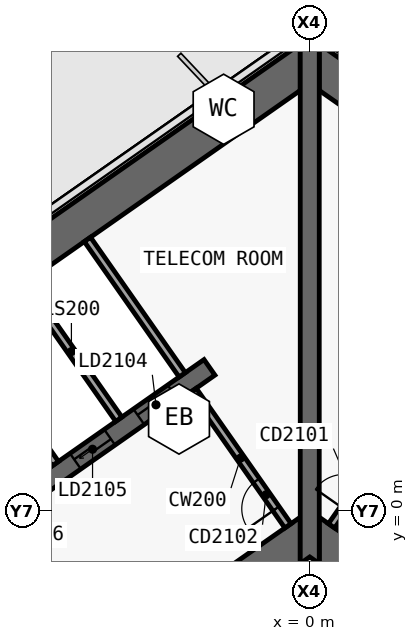
"""IFC4 building model, lengths in metres.
Left out: names, types, materials, properties, quantities, classifications, styles, units other than length and angle.
Written with IfcOpenShell. Run it as: python <this file> out.ifc"""

import sys

from ifc_helpers import new_model, si_unit, direction, frame, frame_2d, origin, place, context, subcontext, project, spatial, polyline, rectangle, outline, extrude, element, fill, save


model = new_model("IFC4")
c1 = context("Model", 3, precision=1e-05, world=origin(), true_north=direction((0.0, 1.0)))
c2 = subcontext(c1, "Body", "Model", "MODEL_VIEW")
j1 = project(units=[si_unit("LENGTHUNIT", "METRE"), si_unit("PLANEANGLEUNIT", "RADIAN")], contexts=[c1])
p1 = place(None, origin())
s1 = spatial("IfcSite", under=j1, at=p1, CompositionType="ELEMENT")
p2 = place(p1, origin())
s2 = spatial("IfcBuilding", under=s1, at=p2, CompositionType="ELEMENT")
p3 = place(p2, frame((0.0, 0.0, 122.9)))
s3 = spatial("IfcBuildingStorey", under=s2, at=p3, CompositionType="ELEMENT", Elevation=122.9)
p4 = place(p3, frame((0.037, 11.867, 0.0), z_axis=(0.0, 0.0, 1.0), x_axis=(-0.819155306259, -0.573571777746, 0.0)))
e1 = element("IfcWall", 1, at=p4, inside=s3, PredefinedType="SHEAR", context=c2, shape_type="SweptSolid", body=[
    extrude(outline(polyline([(33.837, 0.5), (0.7, 0.5), (0.0, -0.5), (33.837, -0.5), (33.837, 0.5)])), origin(), (0.0, 0.0, 1.0), 3.6),
])
p5 = place(p3, frame((0.037, -0.585, 0.0), z_axis=(0.0, 0.0, 1.0), x_axis=(-0.819157152511, -0.573569140985, 0.0)))
e2 = element("IfcWall", 2, at=p5, inside=s3, PredefinedType="SHEAR", context=c2, shape_type="SweptSolid", body=[
    extrude(outline(polyline([(26.695, 0.5), (0.7, 0.5), (0.0, -0.5), (26.695, -0.5), (26.695, 0.5)])), origin(), (0.0, 0.0, 1.0), 3.6),
])
p6 = place(p5, frame((2.995, 0.0, 0.0)))
e3 = element("IfcOpeningElement", 3, at=p6, cuts=e2, PredefinedType="OPENING", context=c2, shape_type="SweptSolid", body=[
    extrude(rectangle(XDim=2.4, YDim=2.1, at=frame_2d((1.2, 1.05))), frame((0.0, 0.51, 0.0), z_axis=(0.0, -1.0, 0.0), x_axis=(1.0, 0.0, 0.0)), (0.0, 0.0, 1.0), 1.02),
])
p7 = place(p5, frame((11.995, 0.0, 0.0)))
e4 = element("IfcOpeningElement", 4, at=p7, cuts=e2, PredefinedType="OPENING", context=c2, shape_type="SweptSolid", body=[
    extrude(rectangle(XDim=2.4, YDim=2.1, at=frame_2d((1.2, 1.05))), frame((0.0, 0.51, 0.0), z_axis=(0.0, -1.0, 0.0), x_axis=(1.0, 0.0, 0.0)), (0.0, 0.0, 1.0), 1.02),
])
p8 = place(p3, frame((-2.638, 3.768, 0.0), z_axis=(0.0, 0.0, 1.0), x_axis=(-0.819148977158, -0.573580816643, 0.0)))
e5 = element("IfcWall", 5, at=p8, inside=s3, PredefinedType="SHEAR", context=c2, shape_type="SweptSolid", body=[
    extrude(outline(polyline([(26.0, 0.25), (0.0, 0.25), (0.0, -0.25), (26.0, -0.25), (26.0, 0.25)])), origin(), (0.0, 0.0, 1.0), 3.6),
])
p9 = place(p8, frame((1.169, 0.0, 0.0)))
e6 = element("IfcOpeningElement", 6, at=p9, cuts=e5, PredefinedType="OPENING", context=c2, shape_type="SweptSolid", body=[
    extrude(rectangle(XDim=1.1, YDim=2.1, at=frame_2d((0.55, 1.05))), frame((0.0, 0.26, 0.0), z_axis=(0.0, -1.0, 0.0), x_axis=(1.0, 0.0, 0.0)), (0.0, 0.0, 1.0), 0.52),
])
p10 = place(p8, frame((3.206, 0.0, 0.0)))
e7 = element("IfcOpeningElement", 7, at=p10, cuts=e5, PredefinedType="OPENING", context=c2, shape_type="SweptSolid", body=[
    extrude(rectangle(XDim=1.1, YDim=2.1, at=frame_2d((0.55, 1.05))), frame((0.0, 0.26, 0.0), z_axis=(0.0, -1.0, 0.0), x_axis=(1.0, 0.0, 0.0)), (0.0, 0.0, 1.0), 0.52),
])
p11 = place(p8, frame((5.244, 0.0, 0.0)))
e8 = element("IfcOpeningElement", 8, at=p11, cuts=e5, PredefinedType="OPENING", context=c2, shape_type="SweptSolid", body=[
    extrude(rectangle(XDim=1.1, YDim=2.1, at=frame_2d((0.55, 1.05))), frame((0.0, 0.26, 0.0), z_axis=(0.0, -1.0, 0.0), x_axis=(1.0, 0.0, 0.0)), (0.0, 0.0, 1.0), 0.52),
])
p12 = place(p8, frame((7.281, 0.0, 0.0)))
e9 = element("IfcOpeningElement", 9, at=p12, cuts=e5, PredefinedType="OPENING", context=c2, shape_type="SweptSolid", body=[
    extrude(rectangle(XDim=1.1, YDim=2.1, at=frame_2d((0.55, 1.05))), frame((0.0, 0.26, 0.0), z_axis=(0.0, -1.0, 0.0), x_axis=(1.0, 0.0, 0.0)), (0.0, 0.0, 1.0), 0.52),
])
p13 = place(p8, frame((9.688, 0.0, 0.0)))
e10 = element("IfcOpeningElement", 10, at=p13, cuts=e5, PredefinedType="OPENING", context=c2, shape_type="SweptSolid", body=[
    extrude(rectangle(XDim=1.1, YDim=2.1, at=frame_2d((0.55, 1.05))), frame((0.0, 0.26, 0.0), z_axis=(0.0, -1.0, 0.0), x_axis=(1.0, 0.0, 0.0)), (0.0, 0.0, 1.0), 0.52),
])
p14 = place(p8, frame((11.863, 0.0, 0.0)))
e11 = element("IfcOpeningElement", 11, at=p14, cuts=e5, PredefinedType="OPENING", context=c2, shape_type="SweptSolid", body=[
    extrude(rectangle(XDim=1.1, YDim=2.1, at=frame_2d((0.55, 1.05))), frame((0.0, 0.26, 0.0), z_axis=(0.0, -1.0, 0.0), x_axis=(1.0, 0.0, 0.0)), (0.0, 0.0, 1.0), 0.52),
])
p15 = place(p8, frame((14.038, 0.0, 0.0)))
e12 = element("IfcOpeningElement", 12, at=p15, cuts=e5, PredefinedType="OPENING", context=c2, shape_type="SweptSolid", body=[
    extrude(rectangle(XDim=1.1, YDim=2.1, at=frame_2d((0.55, 1.05))), frame((0.0, 0.26, 0.0), z_axis=(0.0, -1.0, 0.0), x_axis=(1.0, 0.0, 0.0)), (0.0, 0.0, 1.0), 0.52),
])
p16 = place(p8, frame((16.212, 0.0, 0.0)))
e13 = element("IfcOpeningElement", 13, at=p16, cuts=e5, PredefinedType="OPENING", context=c2, shape_type="SweptSolid", body=[
    extrude(rectangle(XDim=1.1, YDim=2.1, at=frame_2d((0.55, 1.05))), frame((0.0, 0.26, 0.0), z_axis=(0.0, -1.0, 0.0), x_axis=(1.0, 0.0, 0.0)), (0.0, 0.0, 1.0), 0.52),
])
p17 = place(p3, frame((-0.037, 11.867, 0.0), z_axis=(0.0, 0.0, 1.0), x_axis=(0.819155306259, -0.573571777746, 0.0)))
e14 = element("IfcWall", 14, at=p17, inside=s3, PredefinedType="SHEAR", context=c2, shape_type="SweptSolid", body=[
    extrude(outline(polyline([(33.837, 0.5), (0.0, 0.5), (0.7, -0.5), (33.837, -0.5), (33.837, 0.5)])), origin(), (0.0, 0.0, 1.0), 3.6),
])
p18 = place(p3, frame((-0.037, -0.585, 0.0), z_axis=(0.0, 0.0, 1.0), x_axis=(0.819157152511, -0.573569140985, 0.0)))
e15 = element("IfcWall", 15, at=p18, inside=s3, PredefinedType="SHEAR", context=c2, shape_type="SweptSolid", body=[
    extrude(outline(polyline([(26.695, 0.5), (0.0, 0.5), (0.7, -0.5), (26.695, -0.5), (26.695, 0.5)])), origin(), (0.0, 0.0, 1.0), 3.6),
])
p19 = place(p18, frame((1.245, 0.0, 0.0)))
e16 = element("IfcOpeningElement", 16, at=p19, cuts=e15, PredefinedType="OPENING", context=c2, shape_type="SweptSolid", body=[
    extrude(rectangle(XDim=1.5, YDim=2.1, at=frame_2d((0.75, 1.05))), frame((0.0, 0.51, 0.0), z_axis=(0.0, -1.0, 0.0), x_axis=(1.0, 0.0, 0.0)), (0.0, 0.0, 1.0), 1.02),
])
p20 = place(p18, frame((12.445, 0.0, 0.0)))
e17 = element("IfcOpeningElement", 17, at=p20, cuts=e15, PredefinedType="OPENING", context=c2, shape_type="SweptSolid", body=[
    extrude(rectangle(XDim=1.5, YDim=2.1, at=frame_2d((0.75, 1.05))), frame((0.0, 0.51, 0.0), z_axis=(0.0, -1.0, 0.0), x_axis=(1.0, 0.0, 0.0)), (0.0, 0.0, 1.0), 1.02),
])
p21 = place(p3, frame((0.0, -1.396, 0.0), z_axis=(0.0, 0.0, 1.0), x_axis=(0.0, 1.0, 0.0)))
e18 = element("IfcWall", 18, at=p21, inside=s3, PredefinedType="SHEAR", context=c2, shape_type="SweptSolid", body=[
    extrude(outline(polyline([(0.0, -0.25), (0.175, -0.25), (1.221, -0.25), (12.452, -0.25), (13.848, -0.25), (13.857, -0.25), (13.968, -0.172), (13.848, 0.0), (13.968, 0.172), (13.857, 0.25), (13.848, 0.25), (12.452, 0.25), (1.221, 0.25), (0.175, 0.25), (0.0, 0.25), (0.175, 0.0), (0.0, -0.25)])), origin(), (0.0, 0.0, 1.0), 3.6),
])
p22 = place(p3, frame((-5.024, 2.403, 0.0), z_axis=(0.0, 0.0, 1.0), x_axis=(-0.573530143085, 0.819184457233, 0.0)))
e19 = element("IfcWall", 19, at=p22, inside=s3, PredefinedType="SOLIDWALL", context=c2, shape_type="SweptSolid", body=[
    extrude(rectangle(XDim=4.35, YDim=0.2, at=frame_2d((2.175, 0.0))), origin(), (0.0, 0.0, 1.0), 3.6),
])
p23 = place(p3, frame((-6.693, 1.234, 0.0), z_axis=(0.0, 0.0, 1.0), x_axis=(-0.573594173421, 0.819139624372, 0.0)))
e20 = element("IfcWall", 20, at=p23, inside=s3, PredefinedType="SOLIDWALL", context=c2, shape_type="SweptSolid", body=[
    extrude(rectangle(XDim=4.35, YDim=0.2, at=frame_2d((2.175, 0.0))), origin(), (0.0, 0.0, 1.0), 3.6),
])
p24 = place(p3, frame((-0.573, -0.402, 0.0), z_axis=(0.0, 0.0, 1.0), x_axis=(-0.57356780395, 0.819158088694, 0.0)))
e21 = element("IfcWall", 21, at=p24, inside=s3, PredefinedType="SOLIDWALL", context=c2, shape_type="SweptSolid", body=[
    extrude(rectangle(XDim=4.35, YDim=0.2, at=frame_2d((2.175, 0.0))), origin(), (0.0, 0.0, 1.0), 3.32),
])
p25 = place(p24, frame((0.55, 0.0, 0.0)))
e22 = element("IfcOpeningElement", 22, at=p25, cuts=e21, PredefinedType="OPENING", context=c2, shape_type="SweptSolid", body=[
    extrude(rectangle(XDim=0.9, YDim=2.1, at=frame_2d((0.45, 1.05))), frame((0.0, 0.11, 0.0), z_axis=(0.0, -1.0, 0.0), x_axis=(1.0, 0.0, 0.0)), (0.0, 0.0, 1.0), 0.22),
])
p26 = place(p3, frame((-3.355, 3.571, 0.0), z_axis=(0.0, 0.0, 1.0), x_axis=(-0.57356780395, 0.819158088694, 0.0)))
e23 = element("IfcWall", 23, at=p26, inside=s3, PredefinedType="SOLIDWALL", context=c2, shape_type="SweptSolid", body=[
    extrude(rectangle(XDim=4.35, YDim=0.2, at=frame_2d((2.175, 0.0))), origin(), (0.0, 0.0, 1.0), 3.32),
])
p27 = place(p3, frame((0.573, -0.402, 0.0), z_axis=(0.0, 0.0, 1.0), x_axis=(0.57356780395, 0.819158088694, 0.0)))
e24 = element("IfcWall", 24, at=p27, inside=s3, PredefinedType="SOLIDWALL", context=c2, shape_type="SweptSolid", body=[
    extrude(rectangle(XDim=4.35, YDim=0.2, at=frame_2d((2.175, 0.0))), origin(), (0.0, 0.0, 1.0), 3.32),
])
p28 = place(p27, frame((0.55, 0.0, 0.0)))
e25 = element("IfcOpeningElement", 25, at=p28, cuts=e24, PredefinedType="OPENING", context=c2, shape_type="SweptSolid", body=[
    extrude(rectangle(XDim=0.9, YDim=2.1, at=frame_2d((0.45, 1.05))), frame((0.0, 0.11, 0.0), z_axis=(0.0, -1.0, 0.0), x_axis=(1.0, 0.0, 0.0)), (0.0, 0.0, 1.0), 0.22),
])
p29 = place(p9, origin())
e26 = element("IfcDoor", 26, at=p29, inside=s3, OperationType="SLIDING_TO_LEFT", PredefinedType="DOOR", context=c2, shape_type="SweptSolid", body=[
    extrude(rectangle(XDim=1.1, YDim=2.1, at=frame_2d((0.55, 1.05))), frame((0.0, 0.025, 0.0), z_axis=(0.0, -1.0, 0.0), x_axis=(1.0, 0.0, 0.0)), (0.0, 0.0, 1.0), 0.05),
])
fill(e6, e26)
p30 = place(p10, origin())
e27 = element("IfcDoor", 27, at=p30, inside=s3, OperationType="SLIDING_TO_RIGHT", PredefinedType="DOOR", context=c2, shape_type="SweptSolid", body=[
    extrude(rectangle(XDim=1.1, YDim=2.1, at=frame_2d((0.55, 1.05))), frame((0.0, 0.025, 0.0), z_axis=(0.0, -1.0, 0.0), x_axis=(1.0, 0.0, 0.0)), (0.0, 0.0, 1.0), 0.05),
])
fill(e7, e27)
p31 = place(p25, origin())
e28 = element("IfcDoor", 28, at=p31, inside=s3, OperationType="SINGLE_SWING_RIGHT", PredefinedType="DOOR", context=c2, shape_type="SweptSolid", body=[
    extrude(rectangle(XDim=0.9, YDim=2.1, at=frame_2d((0.45, 1.05))), frame((0.0, 0.025, 0.0), z_axis=(0.0, -1.0, 0.0), x_axis=(1.0, 0.0, 0.0)), (0.0, 0.0, 1.0), 0.05),
])
fill(e22, e28)
save(model, sys.argv[1])
